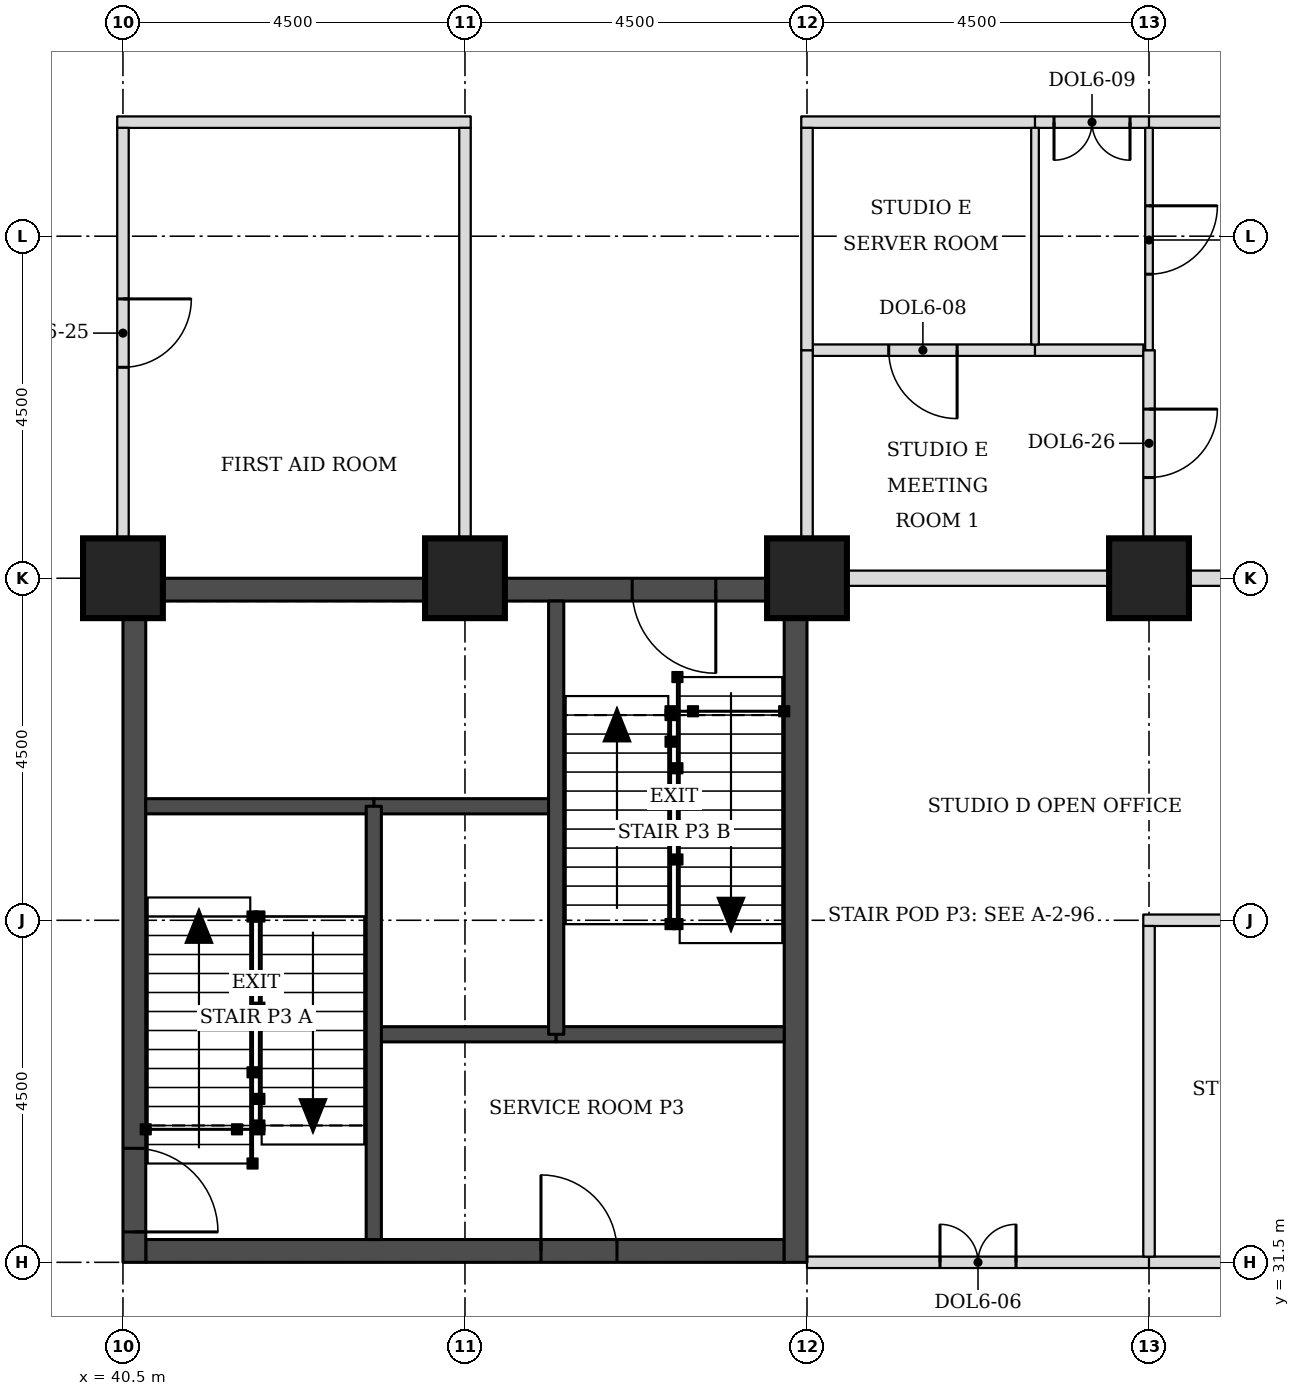
"""IFC4 building model, lengths in metres.
Left out: names, types, materials, properties, quantities, classifications, styles, units other than length and angle.
Written with IfcOpenShell. Run it as: python <this file> out.ifc"""

import sys

from ifc_helpers import new_model, si_unit, direction, frame, frame_2d, origin, origin_2d, place, context, subcontext, project, spatial, rectangle, extrude, element, fill, save


model = new_model("IFC4")
c1 = context("Model", 3, precision=1e-05, world=origin(), true_north=direction((0.0, 1.0)))
c2 = subcontext(c1, "Body", "Model", "MODEL_VIEW")
j1 = project(units=[si_unit("LENGTHUNIT", "METRE"), si_unit("PLANEANGLEUNIT", "RADIAN")], contexts=[c1])
p1 = place(None, origin())
s1 = spatial("IfcSite", under=j1, at=p1, CompositionType="ELEMENT")
p2 = place(p1, origin())
s2 = spatial("IfcBuilding", under=s1, at=p2, CompositionType="ELEMENT")
p3 = place(p2, frame((0.0, 0.0, 115.9)))
s3 = spatial("IfcBuildingStorey", under=s2, at=p3, CompositionType="ELEMENT", Elevation=115.9)
for number, where, z_axis, x_axis in (
    (1, (40.5, 40.5, 0.0), (0.0, 0.0, 1.0), (1.0, 0.0, 0.0)),
    (2, (45.0, 40.5, 0.0), (0.0, 0.0, 1.0), (1.0, 0.0, 0.0)),
    (3, (49.5, 40.5, 0.0), (0.0, 0.0, 1.0), (1.0, 0.0, 0.0)),
    (4, (54.0, 40.5, 0.0), (0.0, 0.0, 1.0), (1.0, 0.0, 0.0)),
):
    element("IfcColumn", number, at=place(p3, frame(where, z_axis=z_axis, x_axis=x_axis)), inside=s3, PredefinedType="COLUMN", context=c2, shape_type="SweptSolid", body=[
        extrude(rectangle(XDim=1.05, YDim=1.05, at=origin_2d()), origin(), (0.0, 0.0, 1.0), 3.7),
    ])
p4 = place(p3, frame((40.8, 31.65, 0.0), z_axis=(0.0, 0.0, 1.0), x_axis=(1.0, 0.0, 0.0)))
e5 = element("IfcWall", 5, at=p4, inside=s3, PredefinedType="SHEAR", context=c2, shape_type="SweptSolid", body=[
    extrude(rectangle(XDim=8.4, YDim=0.3, at=frame_2d((4.2, 0.0))), origin(), (0.0, 0.0, 1.0), 3.7),
])
p5 = place(p4, frame((5.2, 0.0, 0.0)))
e6 = element("IfcOpeningElement", 6, at=p5, cuts=e5, PredefinedType="OPENING", context=c2, shape_type="SweptSolid", body=[
    extrude(rectangle(XDim=1.0, YDim=2.1, at=frame_2d((0.5, 1.05))), frame((0.0, 0.16, 0.0), z_axis=(0.0, -1.0, 0.0), x_axis=(1.0, 0.0, 0.0)), (0.0, 0.0, 1.0), 0.32),
])
p6 = place(p3, frame((40.8, 40.35, 0.0), z_axis=(0.0, 0.0, 1.0), x_axis=(1.0, 0.0, 0.0)))
e7 = element("IfcWall", 7, at=p6, inside=s3, PredefinedType="SHEAR", context=c2, shape_type="SweptSolid", body=[
    extrude(rectangle(XDim=8.4, YDim=0.3, at=frame_2d((4.2, 0.0))), origin(), (0.0, 0.0, 1.0), 3.7),
])
p7 = place(p6, frame((6.4, 0.0, 0.0)))
e8 = element("IfcOpeningElement", 8, at=p7, cuts=e7, PredefinedType="OPENING", context=c2, shape_type="SweptSolid", body=[
    extrude(rectangle(XDim=1.1, YDim=2.1, at=frame_2d((0.55, 1.05))), frame((0.0, 0.16, 0.0), z_axis=(0.0, -1.0, 0.0), x_axis=(1.0, 0.0, 0.0)), (0.0, 0.0, 1.0), 0.32),
])
p8 = place(p3, frame((40.65, 31.5, 0.0), z_axis=(0.0, 0.0, 1.0), x_axis=(0.0, 1.0, 0.0)))
e9 = element("IfcWall", 9, at=p8, inside=s3, PredefinedType="SHEAR", context=c2, shape_type="SweptSolid", body=[
    extrude(rectangle(XDim=9.0, YDim=0.3, at=frame_2d((4.5, 0.0))), origin(), (0.0, 0.0, 1.0), 3.7),
])
p9 = place(p8, frame((0.4, 0.0, 0.0)))
e10 = element("IfcOpeningElement", 10, at=p9, cuts=e9, PredefinedType="OPENING", context=c2, shape_type="SweptSolid", body=[
    extrude(rectangle(XDim=1.1, YDim=2.1, at=frame_2d((0.55, 1.05))), frame((0.0, 0.16, 0.0), z_axis=(0.0, -1.0, 0.0), x_axis=(1.0, 0.0, 0.0)), (0.0, 0.0, 1.0), 0.32),
])
p10 = place(p3, frame((49.35, 31.5, 0.0), z_axis=(0.0, 0.0, 1.0), x_axis=(0.0, 1.0, 0.0)))
e11 = element("IfcWall", 11, at=p10, inside=s3, PredefinedType="SHEAR", context=c2, shape_type="SweptSolid", body=[
    extrude(rectangle(XDim=9.0, YDim=0.3, at=frame_2d((4.5, 0.0))), origin(), (0.0, 0.0, 1.0), 3.7),
])
p11 = place(p3, frame((49.5, 31.5, 0.0), z_axis=(0.0, 0.0, 1.0), x_axis=(1.0, 0.0, 0.0)))
e12 = element("IfcWall", 12, at=p11, inside=s3, PredefinedType="PARTITIONING", context=c2, shape_type="SweptSolid", body=[
    extrude(rectangle(XDim=4.5, YDim=0.15, at=frame_2d((2.25, 0.0))), origin(), (0.0, 0.0, 1.0), 2.55),
])
p12 = place(p11, frame((1.75, 0.0, 0.0)))
e13 = element("IfcOpeningElement", 13, at=p12, cuts=e12, PredefinedType="OPENING", context=c2, shape_type="SweptSolid", body=[
    extrude(rectangle(XDim=1.0, YDim=2.1, at=frame_2d((0.5, 1.05))), frame((0.0, 0.085, 0.0), z_axis=(0.0, -1.0, 0.0), x_axis=(1.0, 0.0, 0.0)), (0.0, 0.0, 1.0), 0.17),
])
p13 = place(p3, frame((54.0, 31.5, 0.0), z_axis=(0.0, 0.0, 1.0), x_axis=(1.0, 0.0, 0.0)))
e14 = element("IfcWall", 14, at=p13, inside=s3, PredefinedType="PARTITIONING", context=c2, shape_type="SweptSolid", body=[
    extrude(rectangle(XDim=5.025, YDim=0.15, at=frame_2d((2.512, 0.0))), origin(), (0.0, 0.0, 1.0), 2.55),
])
p14 = place(p3, frame((53.925, 36.0, 0.0), z_axis=(0.0, 0.0, 1.0), x_axis=(1.0, 0.0, 0.0)))
e15 = element("IfcWall", 15, at=p14, inside=s3, PredefinedType="PARTITIONING", context=c2, shape_type="SweptSolid", body=[
    extrude(rectangle(XDim=5.1, YDim=0.15, at=frame_2d((2.55, 0.0))), origin(), (0.0, 0.0, 1.0), 3.096),
])
p15 = place(p14, frame((2.1, 0.0, 0.0)))
e16 = element("IfcOpeningElement", 16, at=p15, cuts=e15, PredefinedType="OPENING", context=c2, shape_type="SweptSolid", body=[
    extrude(rectangle(XDim=0.9, YDim=2.1, at=frame_2d((0.45, 1.05))), frame((0.0, 0.085, 0.0), z_axis=(0.0, -1.0, 0.0), x_axis=(1.0, 0.0, 0.0)), (0.0, 0.0, 1.0), 0.17),
])
p16 = place(p3, frame((50.015, 40.5, 0.0), z_axis=(0.0, 0.0, 1.0), x_axis=(1.0, 0.0, 0.0)))
e17 = element("IfcWall", 17, at=p16, inside=s3, PredefinedType="PARTITIONING", context=c2, shape_type="SweptSolid", body=[
    extrude(rectangle(XDim=3.46, YDim=0.2, at=frame_2d((1.73, 0.0))), origin(), (0.0, 0.0, 1.0), 2.8),
])
p17 = place(p3, frame((54.495, 40.5, 0.0), z_axis=(0.0, 0.0, 1.0), x_axis=(1.0, 0.0, 0.0)))
e18 = element("IfcWall", 18, at=p17, inside=s3, PredefinedType="PARTITIONING", context=c2, shape_type="SweptSolid", body=[
    extrude(rectangle(XDim=3.48, YDim=0.2, at=frame_2d((1.74, 0.0))), origin(), (0.0, 0.0, 1.0), 2.8),
])
p18 = place(p3, frame((49.575, 43.5, 0.0), z_axis=(0.0, 0.0, 1.0), x_axis=(1.0, 0.0, 0.0)))
e19 = element("IfcWall", 19, at=p18, inside=s3, PredefinedType="PARTITIONING", context=c2, shape_type="SweptSolid", body=[
    extrude(rectangle(XDim=2.925, YDim=0.15, at=frame_2d((1.462, 0.0))), origin(), (0.0, 0.0, 1.0), 3.55),
])
p19 = place(p18, frame((1.0, 0.0, 0.0)))
e20 = element("IfcOpeningElement", 20, at=p19, cuts=e19, PredefinedType="OPENING", context=c2, shape_type="SweptSolid", body=[
    extrude(rectangle(XDim=0.9, YDim=2.1, at=frame_2d((0.45, 1.05))), frame((0.0, 0.085, 0.0), z_axis=(0.0, -1.0, 0.0), x_axis=(1.0, 0.0, 0.0)), (0.0, 0.0, 1.0), 0.17),
])
p20 = place(p3, frame((52.5, 43.5, 0.0), z_axis=(0.0, 0.0, 1.0), x_axis=(1.0, 0.0, 0.0)))
e21 = element("IfcWall", 21, at=p20, inside=s3, PredefinedType="PARTITIONING", context=c2, shape_type="SweptSolid", body=[
    extrude(rectangle(XDim=1.425, YDim=0.15, at=frame_2d((0.712, 0.0))), origin(), (0.0, 0.0, 1.0), 3.55),
])
p21 = place(p3, frame((40.425, 46.5, 0.0), z_axis=(0.0, 0.0, 1.0), x_axis=(1.0, 0.0, 0.0)))
e22 = element("IfcWall", 22, at=p21, inside=s3, PredefinedType="PARTITIONING", context=c2, shape_type="SweptSolid", body=[
    extrude(rectangle(XDim=4.65, YDim=0.15, at=frame_2d((2.325, 0.0))), origin(), (0.0, 0.0, 1.0), 3.55),
])
p22 = place(p3, frame((49.425, 46.5, 0.0), z_axis=(0.0, 0.0, 1.0), x_axis=(1.0, 0.0, 0.0)))
e23 = element("IfcWall", 23, at=p22, inside=s3, PredefinedType="PARTITIONING", context=c2, shape_type="SweptSolid", body=[
    extrude(rectangle(XDim=3.075, YDim=0.15, at=frame_2d((1.538, 0.0))), origin(), (0.0, 0.0, 1.0), 3.55),
])
p23 = place(p3, frame((52.5, 46.5, 0.0), z_axis=(0.0, 0.0, 1.0), x_axis=(1.0, 0.0, 0.0)))
e24 = element("IfcWall", 24, at=p23, inside=s3, PredefinedType="PARTITIONING", context=c2, shape_type="SweptSolid", body=[
    extrude(rectangle(XDim=1.5, YDim=0.15, at=frame_2d((0.75, 0.0))), origin(), (0.0, 0.0, 1.0), 3.55),
])
p24 = place(p23, frame((0.25, 0.0, 0.0)))
e25 = element("IfcOpeningElement", 25, at=p24, cuts=e24, PredefinedType="OPENING", context=c2, shape_type="SweptSolid", body=[
    extrude(rectangle(XDim=1.0, YDim=2.1, at=frame_2d((0.5, 1.05))), frame((0.0, 0.085, 0.0), z_axis=(0.0, -1.0, 0.0), x_axis=(1.0, 0.0, 0.0)), (0.0, 0.0, 1.0), 0.17),
])
p25 = place(p3, frame((54.0, 46.5, 0.0), z_axis=(0.0, 0.0, 1.0), x_axis=(1.0, 0.0, 0.0)))
e26 = element("IfcWall", 26, at=p25, inside=s3, PredefinedType="PARTITIONING", context=c2, shape_type="SweptSolid", body=[
    extrude(rectangle(XDim=16.5, YDim=0.15, at=frame_2d((8.25, 0.0))), origin(), (0.0, 0.0, 1.0), 3.55),
])
p26 = place(p3, frame((54.0, 31.575, 0.0), z_axis=(0.0, 0.0, 1.0), x_axis=(0.0, 1.0, 0.0)))
e27 = element("IfcWall", 27, at=p26, inside=s3, PredefinedType="PARTITIONING", context=c2, shape_type="SweptSolid", body=[
    extrude(rectangle(XDim=4.35, YDim=0.15, at=frame_2d((2.175, 0.0))), origin(), (0.0, 0.0, 1.0), 3.55),
])
p27 = place(p3, frame((40.5, 41.025, 0.0), z_axis=(0.0, 0.0, 1.0), x_axis=(0.0, 1.0, 0.0)))
e28 = element("IfcWall", 28, at=p27, inside=s3, PredefinedType="PARTITIONING", context=c2, shape_type="SweptSolid", body=[
    extrude(rectangle(XDim=5.4, YDim=0.15, at=frame_2d((2.7, 0.0))), origin(), (0.0, 0.0, 1.0), 3.55),
])
p28 = place(p27, frame((2.25, 0.0, 0.0)))
e29 = element("IfcOpeningElement", 29, at=p28, cuts=e28, PredefinedType="OPENING", context=c2, shape_type="SweptSolid", body=[
    extrude(rectangle(XDim=0.9, YDim=2.1, at=frame_2d((0.45, 1.05))), frame((0.0, 0.085, 0.0), z_axis=(0.0, -1.0, 0.0), x_axis=(1.0, 0.0, 0.0)), (0.0, 0.0, 1.0), 0.17),
])
p29 = place(p3, frame((45.0, 41.025, 0.0), z_axis=(0.0, 0.0, 1.0), x_axis=(0.0, 1.0, 0.0)))
e30 = element("IfcWall", 30, at=p29, inside=s3, PredefinedType="PARTITIONING", context=c2, shape_type="SweptSolid", body=[
    extrude(rectangle(XDim=5.4, YDim=0.15, at=frame_2d((2.7, 0.0))), origin(), (0.0, 0.0, 1.0), 3.55),
])
p30 = place(p3, frame((49.5, 41.025, 0.0), z_axis=(0.0, 0.0, 1.0), x_axis=(0.0, 1.0, 0.0)))
e31 = element("IfcWall", 31, at=p30, inside=s3, PredefinedType="PARTITIONING", context=c2, shape_type="SweptSolid", body=[
    extrude(rectangle(XDim=2.475, YDim=0.15, at=frame_2d((1.238, 0.0))), origin(), (0.0, 0.0, 1.0), 3.55),
])
p31 = place(p3, frame((54.0, 41.025, 0.0), z_axis=(0.0, 0.0, 1.0), x_axis=(0.0, 1.0, 0.0)))
e32 = element("IfcWall", 32, at=p31, inside=s3, PredefinedType="PARTITIONING", context=c2, shape_type="SweptSolid", body=[
    extrude(rectangle(XDim=2.475, YDim=0.15, at=frame_2d((1.238, 0.0))), origin(), (0.0, 0.0, 1.0), 3.55),
])
p32 = place(p31, frame((0.8, 0.0, 0.0)))
e33 = element("IfcOpeningElement", 33, at=p32, cuts=e32, PredefinedType="OPENING", context=c2, shape_type="SweptSolid", body=[
    extrude(rectangle(XDim=0.9, YDim=2.1, at=frame_2d((0.45, 1.05))), frame((0.0, 0.085, 0.0), z_axis=(0.0, -1.0, 0.0), x_axis=(1.0, 0.0, 0.0)), (0.0, 0.0, 1.0), 0.17),
])
p33 = place(p3, frame((49.5, 43.5, 0.0), z_axis=(0.0, 0.0, 1.0), x_axis=(0.0, 1.0, 0.0)))
e34 = element("IfcWall", 34, at=p33, inside=s3, PredefinedType="PARTITIONING", context=c2, shape_type="SweptSolid", body=[
    extrude(rectangle(XDim=2.925, YDim=0.15, at=frame_2d((1.462, 0.0))), origin(), (0.0, 0.0, 1.0), 3.55),
])
p34 = place(p3, frame((54.0, 43.5, 0.0), z_axis=(0.0, 0.0, 1.0), x_axis=(0.0, 1.0, 0.0)))
e35 = element("IfcWall", 35, at=p34, inside=s3, PredefinedType="PARTITIONING", context=c2, shape_type="SweptSolid", body=[
    extrude(rectangle(XDim=2.925, YDim=0.1, at=frame_2d((1.462, 0.0))), origin(), (0.0, 0.0, 1.0), 3.55),
])
p35 = place(p34, frame((1.0, 0.0, 0.0)))
e36 = element("IfcOpeningElement", 36, at=p35, cuts=e35, PredefinedType="OPENING", context=c2, shape_type="SweptSolid", body=[
    extrude(rectangle(XDim=0.9, YDim=2.1, at=frame_2d((0.45, 1.05))), frame((0.0, 0.06, 0.0), z_axis=(0.0, -1.0, 0.0), x_axis=(1.0, 0.0, 0.0)), (0.0, 0.0, 1.0), 0.12),
])
p36 = place(p3, frame((52.5, 43.575, 0.0), z_axis=(0.0, 0.0, 1.0), x_axis=(0.0, 1.0, 0.0)))
e37 = element("IfcWall", 37, at=p36, inside=s3, PredefinedType="PARTITIONING", context=c2, shape_type="SweptSolid", body=[
    extrude(rectangle(XDim=2.85, YDim=0.1, at=frame_2d((1.425, 0.0))), origin(), (0.0, 0.0, 1.0), 3.55),
])
p37 = place(p3, frame((43.8, 34.5, 0.0), z_axis=(0.0, 0.0, 1.0), x_axis=(1.0, 0.0, 0.0)))
e38 = element("IfcWall", 38, at=p37, inside=s3, PredefinedType="SOLIDWALL", context=c2, shape_type="SweptSolid", body=[
    extrude(rectangle(XDim=2.4, YDim=0.2, at=frame_2d((1.2, 0.0))), origin(), (0.0, 0.0, 1.0), 3.55),
])
p38 = place(p3, frame((46.2, 34.5, 0.0), z_axis=(0.0, 0.0, 1.0), x_axis=(1.0, 0.0, 0.0)))
e39 = element("IfcWall", 39, at=p38, inside=s3, PredefinedType="SOLIDWALL", context=c2, shape_type="SweptSolid", body=[
    extrude(rectangle(XDim=3.0, YDim=0.2, at=frame_2d((1.5, 0.0))), origin(), (0.0, 0.0, 1.0), 3.55),
])
p39 = place(p3, frame((43.8, 37.5, 0.0), z_axis=(0.0, 0.0, 1.0), x_axis=(1.0, 0.0, 0.0)))
e40 = element("IfcWall", 40, at=p39, inside=s3, PredefinedType="SOLIDWALL", context=c2, shape_type="SweptSolid", body=[
    extrude(rectangle(XDim=2.4, YDim=0.2, at=frame_2d((1.2, 0.0))), origin(), (0.0, 0.0, 1.0), 3.7),
])
p40 = place(p3, frame((40.8, 37.5, 0.0), z_axis=(0.0, 0.0, 1.0), x_axis=(1.0, 0.0, 0.0)))
e41 = element("IfcWall", 41, at=p40, inside=s3, PredefinedType="SOLIDWALL", context=c2, shape_type="SweptSolid", body=[
    extrude(rectangle(XDim=3.0, YDim=0.2, at=frame_2d((1.5, 0.0))), origin(), (0.0, 0.0, 1.0), 3.55),
])
for number, where, z_axis, x_axis in (
    (42, (43.8, 31.8, 0.0), (0.0, 0.0, 1.0), (0.0, 1.0, 0.0)),
    (43, (46.2, 34.5, 0.0), (0.0, 0.0, 1.0), (0.0, 1.0, 0.0)),
):
    element("IfcWall", number, at=place(p3, frame(where, z_axis=z_axis, x_axis=x_axis)), inside=s3, PredefinedType="SOLIDWALL", context=c2, shape_type="SweptSolid", body=[
        extrude(rectangle(XDim=5.7, YDim=0.2, at=frame_2d((2.85, 0.0))), origin(), (0.0, 0.0, 1.0), 3.55),
    ])
p41 = place(p28, frame((0.9, 0.0, 0.0), z_axis=(0.0, 0.0, 1.0), x_axis=(-1.0, 0.0, 0.0)))
e44 = element("IfcDoor", 44, at=p41, inside=s3, OperationType="SINGLE_SWING_LEFT", PredefinedType="DOOR", context=c2, shape_type="SweptSolid", body=[
    extrude(rectangle(XDim=0.9, YDim=2.1, at=frame_2d((0.45, 1.05))), frame((0.0, 0.025, 0.0), z_axis=(0.0, -1.0, 0.0), x_axis=(1.0, 0.0, 0.0)), (0.0, 0.0, 1.0), 0.05),
])
fill(e29, e44)
p42 = place(p12, origin())
e45 = element("IfcDoor", 45, at=p42, inside=s3, OperationType="DOUBLE_DOOR_SINGLE_SWING", PredefinedType="DOOR", context=c2, shape_type="SweptSolid", body=[
    extrude(rectangle(XDim=1.0, YDim=2.1, at=frame_2d((0.5, 1.05))), frame((0.0, 0.025, 0.0), z_axis=(0.0, -1.0, 0.0), x_axis=(1.0, 0.0, 0.0)), (0.0, 0.0, 1.0), 0.05),
])
fill(e13, e45)
p43 = place(p24, frame((1.0, 0.0, 0.0), z_axis=(0.0, 0.0, 1.0), x_axis=(-1.0, 0.0, 0.0)))
e46 = element("IfcDoor", 46, at=p43, inside=s3, OperationType="DOUBLE_DOOR_SINGLE_SWING", PredefinedType="DOOR", context=c2, shape_type="SweptSolid", body=[
    extrude(rectangle(XDim=1.0, YDim=2.1, at=frame_2d((0.5, 1.05))), frame((0.0, 0.025, 0.0), z_axis=(0.0, -1.0, 0.0), x_axis=(1.0, 0.0, 0.0)), (0.0, 0.0, 1.0), 0.05),
])
fill(e25, e46)
p44 = place(p35, frame((0.9, 0.0, 0.0), z_axis=(0.0, 0.0, 1.0), x_axis=(-1.0, 0.0, 0.0)))
e47 = element("IfcDoor", 47, at=p44, inside=s3, OperationType="SINGLE_SWING_LEFT", PredefinedType="DOOR", context=c2, shape_type="SweptSolid", body=[
    extrude(rectangle(XDim=0.9, YDim=2.1, at=frame_2d((0.45, 1.05))), frame((0.0, 0.025, 0.0), z_axis=(0.0, -1.0, 0.0), x_axis=(1.0, 0.0, 0.0)), (0.0, 0.0, 1.0), 0.05),
])
fill(e36, e47)
p45 = place(p32, frame((0.9, 0.0, 0.0), z_axis=(0.0, 0.0, 1.0), x_axis=(-1.0, 0.0, 0.0)))
e48 = element("IfcDoor", 48, at=p45, inside=s3, OperationType="SINGLE_SWING_LEFT", PredefinedType="DOOR", context=c2, shape_type="SweptSolid", body=[
    extrude(rectangle(XDim=0.9, YDim=2.1, at=frame_2d((0.45, 1.05))), frame((0.0, 0.025, 0.0), z_axis=(0.0, -1.0, 0.0), x_axis=(1.0, 0.0, 0.0)), (0.0, 0.0, 1.0), 0.05),
])
fill(e33, e48)
p46 = place(p19, frame((0.9, 0.0, 0.0), z_axis=(0.0, 0.0, 1.0), x_axis=(-1.0, 0.0, 0.0)))
e49 = element("IfcDoor", 49, at=p46, inside=s3, OperationType="SINGLE_SWING_LEFT", PredefinedType="DOOR", context=c2, shape_type="SweptSolid", body=[
    extrude(rectangle(XDim=0.9, YDim=2.1, at=frame_2d((0.45, 1.05))), frame((0.0, 0.025, 0.0), z_axis=(0.0, -1.0, 0.0), x_axis=(1.0, 0.0, 0.0)), (0.0, 0.0, 1.0), 0.05),
])
fill(e20, e49)
p47 = place(p9, frame((1.1, 0.0, 0.0), z_axis=(0.0, 0.0, 1.0), x_axis=(-1.0, 0.0, 0.0)))
e50 = element("IfcDoor", 50, at=p47, inside=s3, OperationType="SINGLE_SWING_RIGHT", PredefinedType="DOOR", context=c2, shape_type="SweptSolid", body=[
    extrude(rectangle(XDim=1.1, YDim=2.1, at=frame_2d((0.55, 1.05))), frame((0.0, 0.025, 0.0), z_axis=(0.0, -1.0, 0.0), x_axis=(1.0, 0.0, 0.0)), (0.0, 0.0, 1.0), 0.05),
])
fill(e10, e50)
p48 = place(p7, frame((1.1, 0.0, 0.0), z_axis=(0.0, 0.0, 1.0), x_axis=(-1.0, 0.0, 0.0)))
e51 = element("IfcDoor", 51, at=p48, inside=s3, OperationType="SINGLE_SWING_LEFT", PredefinedType="DOOR", context=c2, shape_type="SweptSolid", body=[
    extrude(rectangle(XDim=1.1, YDim=2.1, at=frame_2d((0.55, 1.05))), frame((0.0, 0.025, 0.0), z_axis=(0.0, -1.0, 0.0), x_axis=(1.0, 0.0, 0.0)), (0.0, 0.0, 1.0), 0.05),
])
fill(e8, e51)
p49 = place(p5, origin())
e52 = element("IfcDoor", 52, at=p49, inside=s3, OperationType="SINGLE_SWING_LEFT", PredefinedType="DOOR", context=c2, shape_type="SweptSolid", body=[
    extrude(rectangle(XDim=1.0, YDim=2.1, at=frame_2d((0.5, 1.05))), frame((0.0, 0.025, 0.0), z_axis=(0.0, -1.0, 0.0), x_axis=(1.0, 0.0, 0.0)), (0.0, 0.0, 1.0), 0.05),
])
fill(e6, e52)
save(model, sys.argv[1])
